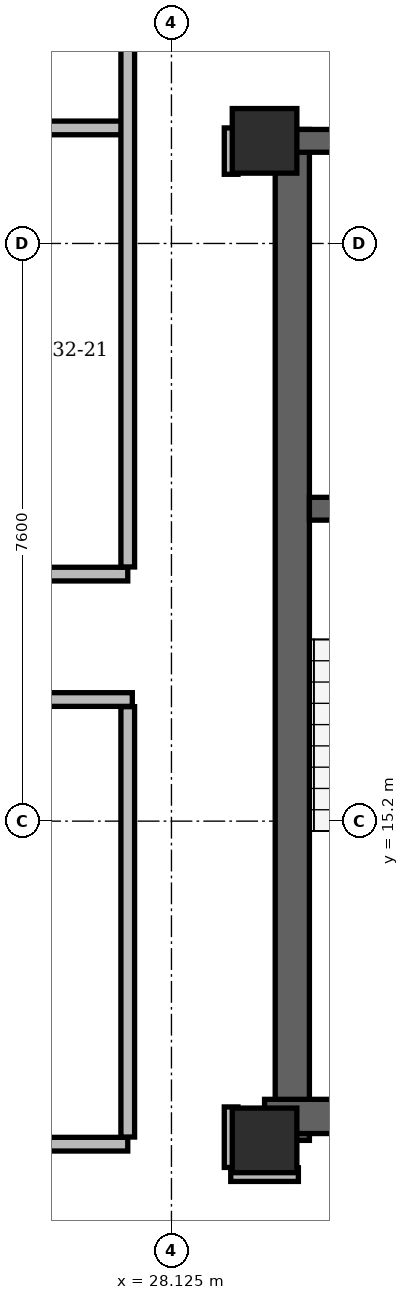
"""IFC4 building model, lengths in metres.
Left out: names, types, materials, properties, quantities, classifications, styles, units other than length and angle.
Written with IfcOpenShell. Run it as: python <this file> out.ifc"""

import sys

from ifc_helpers import new_model, si_unit, direction, frame, frame_2d, origin, origin_2d, place, context, subcontext, project, spatial, rectangle, hollow_rectangle, extrude, element, save


model = new_model("IFC4")
c1 = context("Model", 3, precision=1e-05, world=origin(), true_north=direction((0.0, 1.0)))
c2 = subcontext(c1, "Body", "Model", "MODEL_VIEW")
j1 = project(units=[si_unit("LENGTHUNIT", "METRE"), si_unit("PLANEANGLEUNIT", "RADIAN")], contexts=[c1])
p1 = place(None, origin())
s1 = spatial("IfcSite", under=j1, at=p1, CompositionType="ELEMENT")
p2 = place(p1, origin())
s2 = spatial("IfcBuilding", under=s1, at=p2, CompositionType="ELEMENT")
p3 = place(p2, frame((0.0, 0.0, 123.0)))
s3 = spatial("IfcBuildingStorey", under=s2, at=p3, CompositionType="ELEMENT", Elevation=123.0)
for number, where, z_axis, x_axis in (
    (1, (29.35, 11.0, 0.0), (0.0, 0.0, 1.0), (1.0, 0.0, 0.0)),
    (2, (29.35, 24.15, 0.0), (0.0, 0.0, 1.0), (1.0, 0.0, 0.0)),
):
    element("IfcColumn", number, at=place(p3, frame(where, z_axis=z_axis, x_axis=x_axis)), inside=s3, PredefinedType="COLUMN", context=c2, shape_type="SweptSolid", body=[
        extrude(hollow_rectangle(XDim=0.85, YDim=0.85, WallThickness=0.07, at=origin_2d()), origin(), (0.0, 0.0, 1.0), 3.6),
    ])
p4 = place(p3, frame((29.715, 11.0, 0.0), z_axis=(0.0, 0.0, 1.0), x_axis=(0.0, 1.0, 0.0)))
e3 = element("IfcWall", 3, at=p4, inside=s3, PredefinedType="SHEAR", context=c2, shape_type="SweptSolid", body=[
    extrude(rectangle(XDim=13.3, YDim=0.45, at=frame_2d((6.65, 0.0))), origin(), (0.0, 0.0, 1.0), 3.36),
])
p5 = place(p3, frame((29.35, 11.315, 0.0), z_axis=(0.0, 0.0, 1.0), x_axis=(1.0, 0.0, 0.0)))
e4 = element("IfcWall", 4, at=p5, inside=s3, PredefinedType="SHEAR", context=c2, shape_type="SweptSolid", body=[
    extrude(rectangle(XDim=7.1, YDim=0.45, at=frame_2d((3.55, 0.0))), origin(), (0.0, 0.0, 1.0), 3.36),
])
p6 = place(p3, frame((29.65, 24.15, 0.0), z_axis=(0.0, 0.0, 1.0), x_axis=(1.0, 0.0, 0.0)))
e5 = element("IfcWall", 5, at=p6, inside=s3, PredefinedType="SHEAR", context=c2, shape_type="SweptSolid", body=[
    extrude(rectangle(XDim=15.7, YDim=0.3, at=frame_2d((7.85, 0.0))), origin(), (0.0, 0.0, 1.0), 3.36),
])
p7 = place(p6, frame((1.7, 0.0, 0.0)))
e6 = element("IfcOpeningElement", 6, at=p7, cuts=e5, PredefinedType="OPENING", context=c2, shape_type="SweptSolid", body=[
    extrude(rectangle(XDim=1.2, YDim=2.2, at=frame_2d((0.6, 1.1))), frame((0.0, 0.15, 0.0), z_axis=(0.0, -1.0, 0.0), x_axis=(1.0, 0.0, 0.0)), (0.0, 0.0, 1.0), 0.3),
])
p8 = place(p6, frame((12.8, 0.0, 0.0)))
e7 = element("IfcOpeningElement", 7, at=p8, cuts=e5, PredefinedType="OPENING", context=c2, shape_type="SweptSolid", body=[
    extrude(rectangle(XDim=1.2, YDim=2.2, at=frame_2d((0.6, 1.1))), frame((0.0, 0.15, 0.0), z_axis=(0.0, -1.0, 0.0), x_axis=(1.0, 0.0, 0.0)), (0.0, 0.0, 1.0), 0.3),
])
p9 = place(p6, frame((6.55, 0.0, 0.0)))
e8 = element("IfcOpeningElement", 8, at=p9, cuts=e5, PredefinedType="OPENING", context=c2, shape_type="SweptSolid", body=[
    extrude(rectangle(XDim=0.9, YDim=2.05, at=frame_2d((0.45, 1.025))), frame((0.0, 0.15, 0.0), z_axis=(0.0, -1.0, 0.0), x_axis=(1.0, 0.0, 0.0)), (0.0, 0.0, 1.0), 0.3),
])
p10 = place(p6, frame((8.45, 0.0, 0.0)))
e9 = element("IfcOpeningElement", 9, at=p10, cuts=e5, PredefinedType="OPENING", context=c2, shape_type="SweptSolid", body=[
    extrude(rectangle(XDim=0.9, YDim=2.05, at=frame_2d((0.45, 1.025))), frame((0.0, 0.15, 0.0), z_axis=(0.0, -1.0, 0.0), x_axis=(1.0, 0.0, 0.0)), (0.0, 0.0, 1.0), 0.3),
])
p11 = place(p3, frame((29.94, 19.31, 0.0), z_axis=(0.0, 0.0, 1.0), x_axis=(1.0, 0.0, 0.0)))
e10 = element("IfcWall", 10, at=p11, inside=s3, PredefinedType="SHEAR", context=c2, shape_type="SweptSolid", body=[
    extrude(rectangle(XDim=4.01, YDim=0.3, at=frame_2d((2.005, 0.0))), origin(), (0.0, 0.0, 1.0), 3.36),
])
p12 = place(p11, frame((1.01, 0.0, 0.0)))
e11 = element("IfcOpeningElement", 11, at=p12, cuts=e10, PredefinedType="OPENING", context=c2, shape_type="SweptSolid", body=[
    extrude(rectangle(XDim=1.4, YDim=2.2, at=frame_2d((0.7, 1.1))), frame((0.0, 0.15, 0.0), z_axis=(0.0, -1.0, 0.0), x_axis=(1.0, 0.0, 0.0)), (0.0, 0.0, 1.0), 0.3),
])
p13 = place(p3, frame((32.124, 43.397, 0.0), z_axis=(0.0, 0.0, 1.0), x_axis=(-0.499996370967, -0.866027498997, 0.0)))
e12 = element("IfcWall", 12, at=p13, inside=s3, PredefinedType="SOLIDWALL", context=c2, shape_type="SweptSolid", body=[
    extrude(rectangle(XDim=34.976, YDim=0.34, at=frame_2d((17.488, 0.0))), origin(), (0.0, 0.0, 1.0), 2.578),
])
p14 = place(p13, frame((8.034, 0.0, 0.0)))
e13 = element("IfcOpeningElement", 13, at=p14, cuts=e12, PredefinedType="OPENING", context=c2, shape_type="SweptSolid", body=[
    extrude(rectangle(XDim=1.5, YDim=2.2, at=frame_2d((0.75, 1.1))), frame((0.0, 0.17, 0.0), z_axis=(0.0, -1.0, 0.0), x_axis=(1.0, 0.0, 0.0)), (0.0, 0.0, 1.0), 0.34),
])
p15 = place(p13, frame((26.896, 0.0, 0.0)))
e14 = element("IfcOpeningElement", 14, at=p15, cuts=e12, PredefinedType="OPENING", context=c2, shape_type="SweptSolid", body=[
    extrude(rectangle(XDim=1.5, YDim=2.2, at=frame_2d((0.75, 1.1))), frame((0.0, 0.17, 0.0), z_axis=(0.0, -1.0, 0.0), x_axis=(1.0, 0.0, 0.0)), (0.0, 0.0, 1.0), 0.34),
])
p16 = place(p13, frame((32.562, 0.0, 0.85)))
e15 = element("IfcOpeningElement", 15, at=p16, cuts=e12, PredefinedType="OPENING", context=c2, shape_type="SweptSolid", body=[
    extrude(rectangle(XDim=1.4, YDim=1.6, at=frame_2d((0.7, 0.8))), frame((0.0, 0.17, 0.0), z_axis=(0.0, -1.0, 0.0), x_axis=(1.0, 0.0, 0.0)), (0.0, 0.0, 1.0), 0.34),
])
p17 = place(p13, frame((22.614, 0.0, 0.85)))
e16 = element("IfcOpeningElement", 16, at=p17, cuts=e12, PredefinedType="OPENING", context=c2, shape_type="SweptSolid", body=[
    extrude(rectangle(XDim=1.2, YDim=1.48, at=frame_2d((0.6, 0.74))), frame((0.0, 0.17, 0.0), z_axis=(0.0, -1.0, 0.0), x_axis=(1.0, 0.0, 0.0)), (0.0, 0.0, 1.0), 0.34),
])
p18 = place(p13, frame((2.415, 0.0, 0.85)))
e17 = element("IfcOpeningElement", 17, at=p18, cuts=e12, PredefinedType="OPENING", context=c2, shape_type="SweptSolid", body=[
    extrude(rectangle(XDim=1.4, YDim=1.6, at=frame_2d((0.7, 0.8))), frame((0.0, 0.17, 0.0), z_axis=(0.0, -1.0, 0.0), x_axis=(1.0, 0.0, 0.0)), (0.0, 0.0, 1.0), 0.34),
])
p19 = place(p13, frame((13.492, 0.0, 0.85)))
e18 = element("IfcOpeningElement", 18, at=p19, cuts=e12, PredefinedType="OPENING", context=c2, shape_type="SweptSolid", body=[
    extrude(rectangle(XDim=2.5, YDim=1.618, at=frame_2d((1.25, 0.809))), frame((0.0, 0.17, 0.0), z_axis=(0.0, -1.0, 0.0), x_axis=(1.0, 0.0, 0.0)), (0.0, 0.0, 1.0), 0.34),
])
p20 = place(p13, frame((18.281, 0.0, 0.85)))
e19 = element("IfcOpeningElement", 19, at=p20, cuts=e12, PredefinedType="OPENING", context=c2, shape_type="SweptSolid", body=[
    extrude(rectangle(XDim=1.2, YDim=1.48, at=frame_2d((0.6, 0.74))), frame((0.0, 0.17, 0.0), z_axis=(0.0, -1.0, 0.0), x_axis=(1.0, 0.0, 0.0)), (0.0, 0.0, 1.0), 0.34),
])
p21 = place(p13, frame((20.476, 0.0, 0.85)))
e20 = element("IfcOpeningElement", 20, at=p21, cuts=e12, PredefinedType="OPENING", context=c2, shape_type="SweptSolid", body=[
    extrude(rectangle(XDim=1.2, YDim=1.48, at=frame_2d((0.6, 0.74))), frame((0.0, 0.17, 0.0), z_axis=(0.0, -1.0, 0.0), x_axis=(1.0, 0.0, 0.0)), (0.0, 0.0, 1.0), 0.34),
])
p22 = place(p3, frame((28.905, 10.55, 0.0), z_axis=(0.0, 0.0, 1.0), x_axis=(1.0, 0.0, 0.0)))
e21 = element("IfcWall", 21, at=p22, inside=s3, PredefinedType="PARTITIONING", context=c2, shape_type="SweptSolid", body=[
    extrude(rectangle(XDim=0.89, YDim=0.18, at=frame_2d((0.445, 0.0))), origin(), (0.0, 0.0, 1.0), 3.36),
])
p23 = place(p3, frame((19.6, 10.95, 0.0), z_axis=(0.0, 0.0, 1.0), x_axis=(1.0, 0.0, 0.0)))
e22 = element("IfcWall", 22, at=p23, inside=s3, PredefinedType="PARTITIONING", context=c2, shape_type="SweptSolid", body=[
    extrude(rectangle(XDim=7.95, YDim=0.18, at=frame_2d((3.975, 0.0))), origin(), (0.0, 0.0, 1.0), 3.36),
])
p24 = place(p3, frame((16.969, 16.8, 0.0), z_axis=(0.0, 0.0, 1.0), x_axis=(1.0, 0.0, 0.0)))
e23 = element("IfcWall", 23, at=p24, inside=s3, PredefinedType="PARTITIONING", context=c2, shape_type="SweptSolid", body=[
    extrude(rectangle(XDim=10.641, YDim=0.18, at=frame_2d((5.32, 0.0))), origin(), (0.0, 0.0, 1.0), 3.36),
])
p25 = place(p3, frame((17.922, 18.45, 0.0), z_axis=(0.0, 0.0, 1.0), x_axis=(1.0, 0.0, 0.0)))
e24 = element("IfcWall", 24, at=p25, inside=s3, PredefinedType="PARTITIONING", context=c2, shape_type="SweptSolid", body=[
    extrude(rectangle(XDim=9.628, YDim=0.18, at=frame_2d((4.814, 0.0))), origin(), (0.0, 0.0, 1.0), 3.36),
])
p26 = place(p25, frame((2.908, 0.0, 0.0)))
e25 = element("IfcOpeningElement", 25, at=p26, cuts=e24, PredefinedType="OPENING", context=c2, shape_type="SweptSolid", body=[
    extrude(rectangle(XDim=1.0, YDim=2.18, at=frame_2d((0.5, 1.09))), frame((0.0, 0.09, 0.0), z_axis=(0.0, -1.0, 0.0), x_axis=(1.0, 0.0, 0.0)), (0.0, 0.0, 1.0), 0.18),
])
p27 = place(p3, frame((21.311, 24.32, 0.0), z_axis=(0.0, 0.0, 1.0), x_axis=(1.0, 0.0, 0.0)))
e26 = element("IfcWall", 26, at=p27, inside=s3, PredefinedType="PARTITIONING", context=c2, shape_type="SweptSolid", body=[
    extrude(rectangle(XDim=6.299, YDim=0.18, at=frame_2d((3.149, 0.0))), origin(), (0.0, 0.0, 1.0), 3.36),
])
p28 = place(p3, frame((27.55, 11.044, 0.0), z_axis=(0.0, 0.0, 1.0), x_axis=(0.0, 1.0, 0.0)))
e27 = element("IfcWall", 27, at=p28, inside=s3, PredefinedType="PARTITIONING", context=c2, shape_type="SweptSolid", body=[
    extrude(rectangle(XDim=5.662, YDim=0.18, at=frame_2d((2.831, 0.0))), origin(), (0.0, 0.0, 1.0), 2.814),
])
p29 = place(p3, frame((27.55, 18.544, 0.0), z_axis=(0.0, 0.0, 1.0), x_axis=(0.0, 1.0, 0.0)))
e28 = element("IfcWall", 28, at=p29, inside=s3, PredefinedType="PARTITIONING", context=c2, shape_type="SweptSolid", body=[
    extrude(rectangle(XDim=7.332, YDim=0.18, at=frame_2d((3.666, 0.0))), origin(), (0.0, 0.0, 1.0), 3.36),
])
p30 = place(p3, frame((28.91, 10.644, 0.0), z_axis=(0.0, 0.0, 1.0), x_axis=(0.0, 1.0, 0.0)))
e29 = element("IfcWall", 29, at=p30, inside=s3, PredefinedType="PARTITIONING", context=c2, shape_type="SweptSolid", body=[
    extrude(rectangle(XDim=0.796, YDim=0.18, at=frame_2d((0.398, 0.0))), origin(), (0.0, 0.0, 1.0), 2.814),
])
p31 = place(p3, frame((28.91, 23.71, 0.0), z_axis=(0.0, 0.0, 1.0), x_axis=(0.0, 1.0, 0.0)))
e30 = element("IfcWall", 30, at=p31, inside=s3, PredefinedType="PARTITIONING", context=c2, shape_type="SweptSolid", body=[
    extrude(rectangle(XDim=0.61, YDim=0.18, at=frame_2d((0.305, 0.0))), origin(), (0.0, 0.0, 1.0), 3.36),
])
save(model, sys.argv[1])
